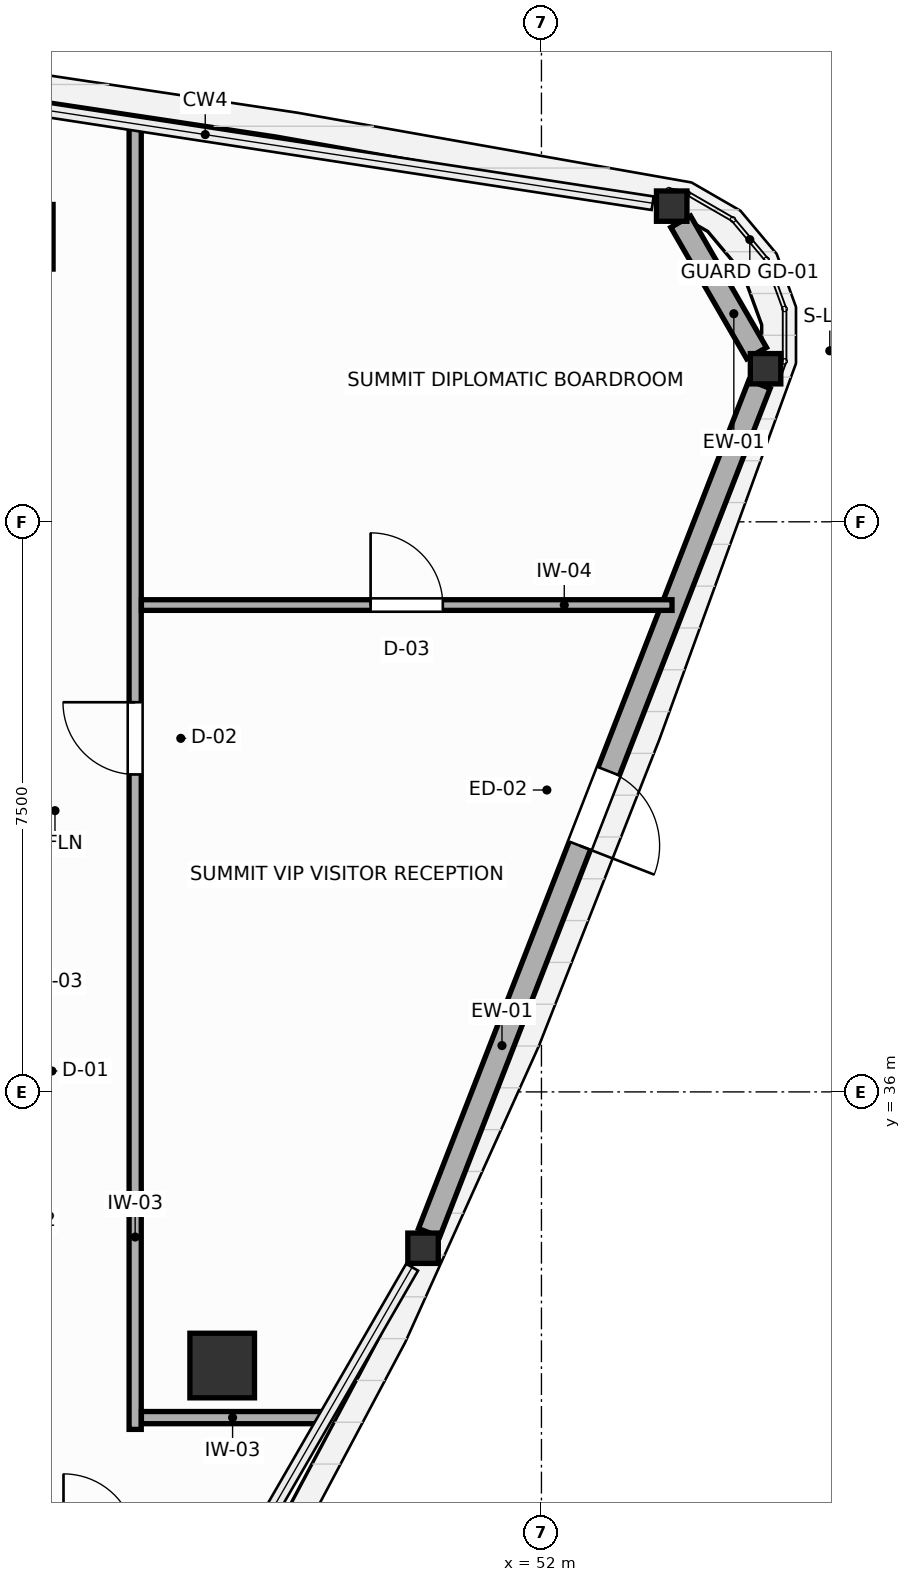
"""IFC4 building model, lengths in metres.
Left out: names, types, materials, properties, quantities, classifications, styles, units other than length and angle.
Written with IfcOpenShell. Run it as: python <this file> out.ifc"""

import sys

from ifc_helpers import new_model, si_unit, direction, frame, frame_2d, origin, origin_2d, place, context, subcontext, project, spatial, rectangle, i_section, extrude, source, transform, mapped, element, fill, save


model = new_model("IFC4")
c1 = context("Model", 3, precision=1e-05, world=origin(), true_north=direction((0.0, 1.0)))
c2 = subcontext(c1, "Body", "Model", "MODEL_VIEW")
j1 = project(units=[si_unit("LENGTHUNIT", "METRE"), si_unit("PLANEANGLEUNIT", "RADIAN")], contexts=[c1])
p1 = place(None, origin())
s1 = spatial("IfcSite", under=j1, at=p1, CompositionType="ELEMENT")
p2 = place(p1, origin())
s2 = spatial("IfcBuilding", under=s1, at=p2, CompositionType="ELEMENT")
p3 = place(p2, frame((0.0, 0.0, 283.8)))
s3 = spatial("IfcBuildingStorey", under=s2, at=p3, CompositionType="ELEMENT", Elevation=283.8)
m1 = source(origin(), c2, "Body", "SweptSolid", [
    extrude(rectangle(XDim=0.85, YDim=0.85, at=origin_2d()), origin(), (0.0, 0.0, 1.0), 4.2),
])
for number, where, z_axis, x_axis in (
    (1, (45.15, 47.25, 0.0), (0.0, 0.0, 1.0), (1.0, 0.0, 0.0)),
    (2, (47.8, 32.4, 0.0), (0.0, 0.0, 1.0), (1.0, 0.0, 0.0)),
):
    element("IfcColumn", number, at=place(p3, frame(where, z_axis=z_axis, x_axis=x_axis)), inside=s3, PredefinedType="COLUMN", context=c2, shape_type="MappedRepresentation", body=[
        mapped(m1, transform((0.0, 0.0, 0.0), scale=1.0)),
    ])
m2 = source(origin(), c2, "Body", "SweptSolid", [
    extrude(i_section(OverallWidth=0.401, OverallDepth=0.399, WebThickness=0.022, FlangeThickness=0.036, FilletRadius=0.015, at=origin_2d()), origin(), (0.0, 0.0, 1.0), 4.2),
])
for number, where, z_axis, x_axis in (
    (3, (54.949, 45.514, 0.0), (0.0, 0.0, 1.0), (1.0, 0.0, 0.0)),
    (4, (53.714, 47.653, 0.0), (0.0, 0.0, 1.0), (1.0, 0.0, 0.0)),
    (5, (50.442, 33.943, 0.0), (0.0, 0.0, 1.0), (1.0, 0.0, 0.0)),
):
    element("IfcColumn", number, at=place(p3, frame(where, z_axis=z_axis, x_axis=x_axis)), inside=s3, PredefinedType="COLUMN", context=c2, shape_type="MappedRepresentation", body=[
        mapped(m2, transform((0.0, 0.0, 0.0), scale=1.0)),
    ])
p4 = place(p3, frame((54.831, 45.719, 0.0), z_axis=(0.0, 0.0, 1.0), x_axis=(-0.499990466345, 0.866030907973, 0.0)))
e6 = element("IfcWall", 6, at=p4, inside=s3, PredefinedType="SOLIDWALL", context=c2, shape_type="SweptSolid", body=[
    extrude(rectangle(XDim=1.998, YDim=0.3, at=frame_2d((0.999, 0.0))), origin(), (0.0, 0.0, 1.0), 2.52),
])
p5 = place(p3, frame((50.522, 34.148, 0.0), z_axis=(0.0, 0.0, 1.0), x_axis=(0.362913406034, 0.931822869284, 0.0)))
e7 = element("IfcWall", 7, at=p5, inside=s3, PredefinedType="SOLIDWALL", context=c2, shape_type="SweptSolid", body=[
    extrude(rectangle(XDim=11.979, YDim=0.3, at=frame_2d((5.989, 0.0))), origin(), (0.0, 0.0, 1.0), 2.52),
])
p6 = place(p5, frame((5.464, 0.0, 0.0)))
e8 = element("IfcOpeningElement", 8, at=p6, cuts=e7, PredefinedType="OPENING", context=c2, shape_type="SweptSolid", body=[
    extrude(rectangle(XDim=1.05, YDim=2.1, at=frame_2d((0.525, 1.05))), frame((0.0, 0.16, 0.0), z_axis=(0.0, -1.0, 0.0), x_axis=(1.0, 0.0, 0.0)), (0.0, 0.0, 1.0), 0.32),
])
p7 = place(p3, frame((46.655, 31.56, 0.0), z_axis=(0.0, 0.0, 1.0), x_axis=(0.0, 1.0, 0.0)))
e9 = element("IfcWall", 9, at=p7, inside=s3, PredefinedType="PARTITIONING", context=c2, shape_type="SweptSolid", body=[
    extrude(rectangle(XDim=17.156, YDim=0.16, at=frame_2d((8.578, 0.0))), origin(), (0.0, 0.0, 1.0), 3.96),
])
p8 = place(p7, frame((8.616, 0.0, 0.0)))
e10 = element("IfcOpeningElement", 10, at=p8, cuts=e9, PredefinedType="OPENING", context=c2, shape_type="SweptSolid", body=[
    extrude(rectangle(XDim=0.95, YDim=2.05, at=frame_2d((0.475, 1.025))), frame((0.0, 0.09, 0.0), z_axis=(0.0, -1.0, 0.0), x_axis=(1.0, 0.0, 0.0)), (0.0, 0.0, 1.0), 0.18),
])
p9 = place(p3, frame((46.737, 31.715, 0.0), z_axis=(0.0, 0.0, 1.0), x_axis=(1.0, 0.0, 0.0)))
e11 = element("IfcWall", 11, at=p9, inside=s3, PredefinedType="PARTITIONING", context=c2, shape_type="SweptSolid", body=[
    extrude(rectangle(XDim=2.399, YDim=0.16, at=frame_2d((1.199, 0.0))), origin(), (0.0, 0.0, 1.0), 3.96),
])
p10 = place(p3, frame((46.737, 42.405, 0.0), z_axis=(0.0, 0.0, 1.0), x_axis=(1.0, 0.0, 0.0)))
e12 = element("IfcWall", 12, at=p10, inside=s3, PredefinedType="PARTITIONING", context=c2, shape_type="SweptSolid", body=[
    extrude(rectangle(XDim=6.981, YDim=0.14, at=frame_2d((3.49, 0.0))), origin(), (0.0, 0.0, 1.0), 3.96),
])
p11 = place(p10, frame((3.015, 0.0, 0.0)))
e13 = element("IfcOpeningElement", 13, at=p11, cuts=e12, PredefinedType="OPENING", context=c2, shape_type="SweptSolid", body=[
    extrude(rectangle(XDim=0.95, YDim=2.05, at=frame_2d((0.475, 1.025))), frame((0.0, 0.08, 0.0), z_axis=(0.0, -1.0, 0.0), x_axis=(1.0, 0.0, 0.0)), (0.0, 0.0, 1.0), 0.16),
])
p12 = place(p6, frame((1.05, 0.0, 0.0), z_axis=(0.0, 0.0, 1.0), x_axis=(-1.0, 0.0, 0.0)))
e14 = element("IfcDoor", 14, at=p12, inside=s3, OperationType="SINGLE_SWING_RIGHT", PredefinedType="DOOR", context=c2, shape_type="SweptSolid", body=[
    extrude(rectangle(XDim=1.05, YDim=2.1, at=frame_2d((0.525, 1.05))), frame((0.0, 0.025, 0.0), z_axis=(0.0, -1.0, 0.0), x_axis=(1.0, 0.0, 0.0)), (0.0, 0.0, 1.0), 0.05),
])
fill(e8, e14)
p13 = place(p8, origin())
e15 = element("IfcDoor", 15, at=p13, inside=s3, OperationType="SINGLE_SWING_RIGHT", PredefinedType="DOOR", context=c2, shape_type="SweptSolid", body=[
    extrude(rectangle(XDim=0.95, YDim=2.05, at=frame_2d((0.475, 1.025))), frame((0.0, 0.025, 0.0), z_axis=(0.0, -1.0, 0.0), x_axis=(1.0, 0.0, 0.0)), (0.0, 0.0, 1.0), 0.05),
])
fill(e10, e15)
p14 = place(p11, origin())
e16 = element("IfcDoor", 16, at=p14, inside=s3, OperationType="SINGLE_SWING_LEFT", PredefinedType="DOOR", context=c2, shape_type="SweptSolid", body=[
    extrude(rectangle(XDim=0.95, YDim=2.05, at=frame_2d((0.475, 1.025))), frame((0.0, 0.025, 0.0), z_axis=(0.0, -1.0, 0.0), x_axis=(1.0, 0.0, 0.0)), (0.0, 0.0, 1.0), 0.05),
])
fill(e13, e16)
save(model, sys.argv[1])
